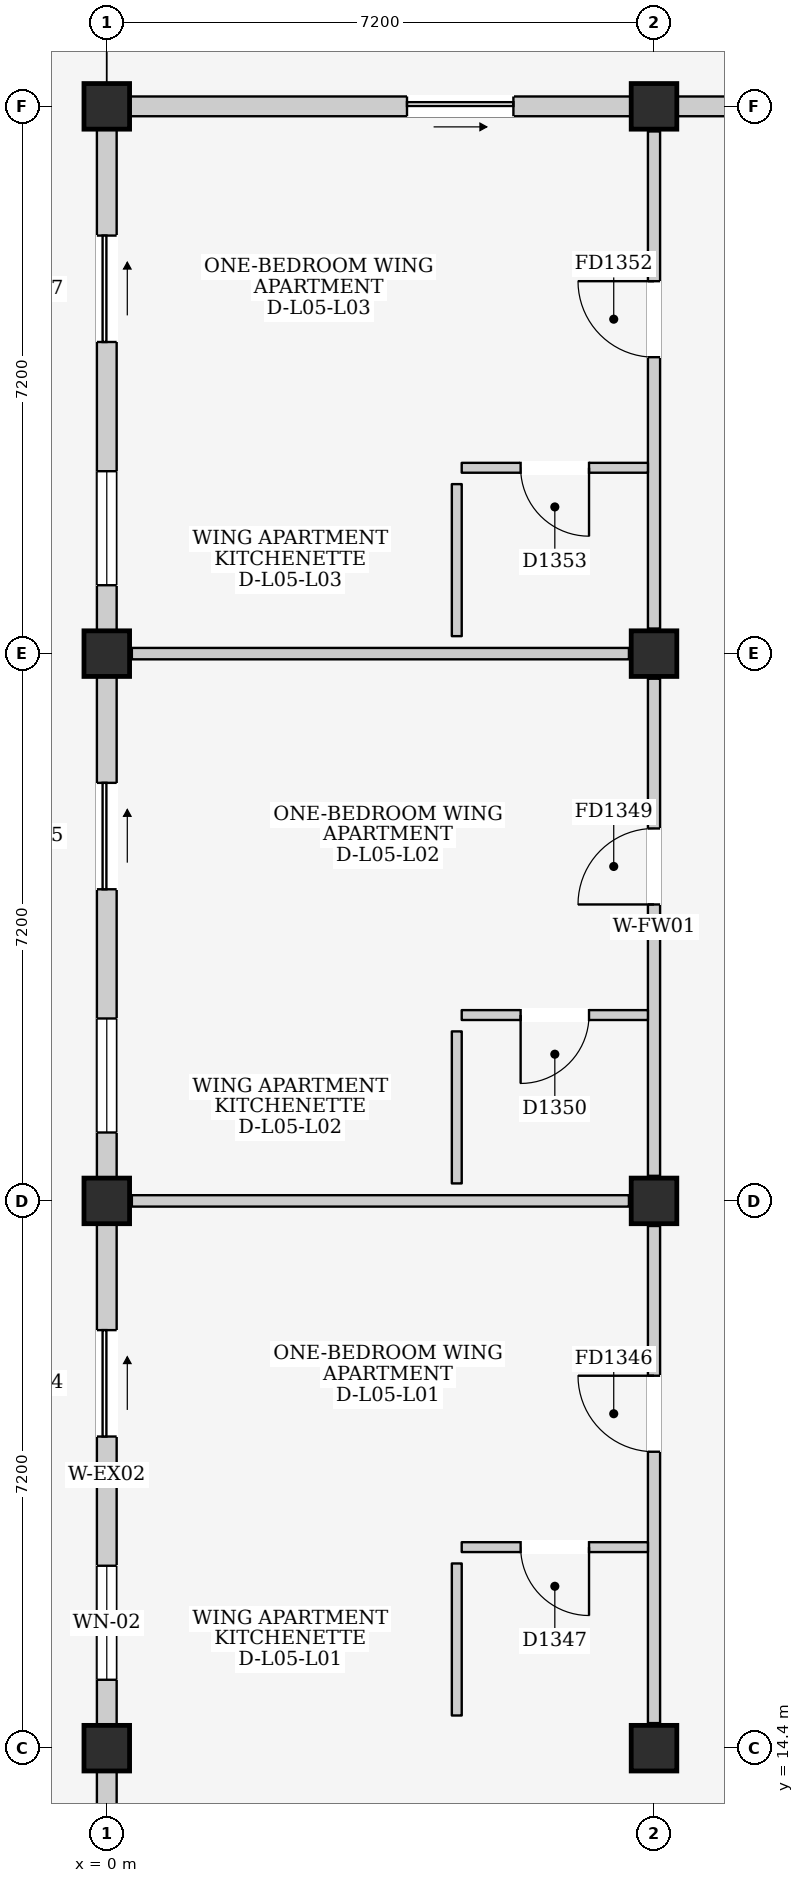
"""IFC4 building model, lengths in metres.
Left out: names, types, materials, properties, quantities, classifications, styles, units other than length and angle.
Written with IfcOpenShell. Run it as: python <this file> out.ifc"""

import sys

from ifc_helpers import new_model, si_unit, direction, frame, frame_2d, origin, origin_2d, place, context, subcontext, project, spatial, rectangle, extrude, element, fill, save


model = new_model("IFC4")
c1 = context("Model", 3, precision=1e-05, world=origin(), true_north=direction((0.0, 1.0)))
c2 = subcontext(c1, "Body", "Model", "MODEL_VIEW")
j1 = project(units=[si_unit("LENGTHUNIT", "METRE"), si_unit("PLANEANGLEUNIT", "RADIAN")], contexts=[c1])
p1 = place(None, origin())
s1 = spatial("IfcSite", under=j1, at=p1, CompositionType="ELEMENT")
p2 = place(p1, origin())
s2 = spatial("IfcBuilding", under=s1, at=p2, CompositionType="ELEMENT")
p3 = place(p2, frame((0.0, 0.0, 18.6)))
s3 = spatial("IfcBuildingStorey", under=s2, at=p3, CompositionType="ELEMENT", Elevation=18.6)
for number, where, z_axis, x_axis in (
    (1, (0.0, 14.4, 0.0), (0.0, 0.0, 1.0), (1.0, 0.0, 0.0)),
    (2, (0.0, 21.6, 0.0), (0.0, 0.0, 1.0), (1.0, 0.0, 0.0)),
    (3, (0.0, 28.8, 0.0), (0.0, 0.0, 1.0), (1.0, 0.0, 0.0)),
    (4, (0.0, 36.0, 0.0), (0.0, 0.0, 1.0), (1.0, 0.0, 0.0)),
    (5, (7.2, 14.4, 0.0), (0.0, 0.0, 1.0), (1.0, 0.0, 0.0)),
    (6, (7.2, 21.6, 0.0), (0.0, 0.0, 1.0), (1.0, 0.0, 0.0)),
    (7, (7.2, 28.8, 0.0), (0.0, 0.0, 1.0), (1.0, 0.0, 0.0)),
    (8, (7.2, 36.0, 0.0), (0.0, 0.0, 1.0), (1.0, 0.0, 0.0)),
):
    element("IfcColumn", number, at=place(p3, frame(where, z_axis=z_axis, x_axis=x_axis)), inside=s3, PredefinedType="COLUMN", context=c2, shape_type="SweptSolid", body=[
        extrude(rectangle(XDim=0.6, YDim=0.6, at=origin_2d()), origin(), (0.0, 0.0, 1.0), 3.3),
    ])
p4 = place(p3, frame((0.0, 7.5, 0.0), z_axis=(0.0, 0.0, 1.0), x_axis=(0.0, 1.0, 0.0)))
e9 = element("IfcWall", 9, at=p4, inside=s3, PredefinedType="ELEMENTEDWALL", context=c2, shape_type="SweptSolid", body=[
    extrude(rectangle(XDim=6.6, YDim=0.26, at=frame_2d((3.3, 0.0))), origin(), (0.0, 0.0, 1.0), 2.595),
])
p5 = place(p4, frame((3.65, 0.0, 0.0)))
e10 = element("IfcOpeningElement", 10, at=p5, cuts=e9, PredefinedType="OPENING", context=c2, shape_type="SweptSolid", body=[
    extrude(rectangle(XDim=1.4, YDim=2.1, at=frame_2d((0.7, 1.05))), frame((0.0, 0.145, 0.0), z_axis=(0.0, -1.0, 0.0), x_axis=(1.0, 0.0, 0.0)), (0.0, 0.0, 1.0), 0.29),
])
p6 = place(p3, frame((0.0, 14.7, 0.0), z_axis=(0.0, 0.0, 1.0), x_axis=(0.0, 1.0, 0.0)))
e11 = element("IfcWall", 11, at=p6, inside=s3, PredefinedType="ELEMENTEDWALL", context=c2, shape_type="SweptSolid", body=[
    extrude(rectangle(XDim=6.6, YDim=0.26, at=frame_2d((3.3, 0.0))), origin(), (0.0, 0.0, 1.0), 2.595),
])
p7 = place(p6, frame((3.8, 0.0, 0.0)))
e12 = element("IfcOpeningElement", 12, at=p7, cuts=e11, PredefinedType="OPENING", context=c2, shape_type="SweptSolid", body=[
    extrude(rectangle(XDim=1.4, YDim=2.1, at=frame_2d((0.7, 1.05))), frame((0.0, 0.145, 0.0), z_axis=(0.0, -1.0, 0.0), x_axis=(1.0, 0.0, 0.0)), (0.0, 0.0, 1.0), 0.29),
])
p8 = place(p6, frame((0.6, 0.0, 0.95)))
e13 = element("IfcOpeningElement", 13, at=p8, cuts=e11, PredefinedType="OPENING", context=c2, shape_type="SweptSolid", body=[
    extrude(rectangle(XDim=1.5, YDim=1.5, at=frame_2d((0.75, 0.75))), frame((0.0, 0.145, 0.0), z_axis=(0.0, -1.0, 0.0), x_axis=(1.0, 0.0, 0.0)), (0.0, 0.0, 1.0), 0.29),
])
p9 = place(p3, frame((0.0, 21.9, 0.0), z_axis=(0.0, 0.0, 1.0), x_axis=(0.0, 1.0, 0.0)))
e14 = element("IfcWall", 14, at=p9, inside=s3, PredefinedType="ELEMENTEDWALL", context=c2, shape_type="SweptSolid", body=[
    extrude(rectangle(XDim=6.6, YDim=0.26, at=frame_2d((3.3, 0.0))), origin(), (0.0, 0.0, 1.0), 2.595),
])
p10 = place(p9, frame((3.8, 0.0, 0.0)))
e15 = element("IfcOpeningElement", 15, at=p10, cuts=e14, PredefinedType="OPENING", context=c2, shape_type="SweptSolid", body=[
    extrude(rectangle(XDim=1.4, YDim=2.1, at=frame_2d((0.7, 1.05))), frame((0.0, 0.145, 0.0), z_axis=(0.0, -1.0, 0.0), x_axis=(1.0, 0.0, 0.0)), (0.0, 0.0, 1.0), 0.29),
])
p11 = place(p9, frame((0.6, 0.0, 0.95)))
e16 = element("IfcOpeningElement", 16, at=p11, cuts=e14, PredefinedType="OPENING", context=c2, shape_type="SweptSolid", body=[
    extrude(rectangle(XDim=1.5, YDim=1.5, at=frame_2d((0.75, 0.75))), frame((0.0, 0.145, 0.0), z_axis=(0.0, -1.0, 0.0), x_axis=(1.0, 0.0, 0.0)), (0.0, 0.0, 1.0), 0.29),
])
p12 = place(p3, frame((0.3, 36.0, 0.0), z_axis=(0.0, 0.0, 1.0), x_axis=(1.0, 0.0, 0.0)))
e17 = element("IfcWall", 17, at=p12, inside=s3, PredefinedType="ELEMENTEDWALL", context=c2, shape_type="SweptSolid", body=[
    extrude(rectangle(XDim=6.6, YDim=0.26, at=frame_2d((3.3, 0.0))), origin(), (0.0, 0.0, 1.0), 2.445),
])
p13 = place(p12, frame((3.65, 0.0, 0.0)))
e18 = element("IfcOpeningElement", 18, at=p13, cuts=e17, PredefinedType="OPENING", context=c2, shape_type="SweptSolid", body=[
    extrude(rectangle(XDim=1.4, YDim=2.1, at=frame_2d((0.7, 1.05))), frame((0.0, 0.145, 0.0), z_axis=(0.0, -1.0, 0.0), x_axis=(1.0, 0.0, 0.0)), (0.0, 0.0, 1.0), 0.29),
])
p14 = place(p3, frame((0.0, 29.1, 0.0), z_axis=(0.0, 0.0, 1.0), x_axis=(0.0, 1.0, 0.0)))
e19 = element("IfcWall", 19, at=p14, inside=s3, PredefinedType="ELEMENTEDWALL", context=c2, shape_type="SweptSolid", body=[
    extrude(rectangle(XDim=6.6, YDim=0.26, at=frame_2d((3.3, 0.0))), origin(), (0.0, 0.0, 1.0), 2.595),
])
p15 = place(p14, frame((3.8, 0.0, 0.0)))
e20 = element("IfcOpeningElement", 20, at=p15, cuts=e19, PredefinedType="OPENING", context=c2, shape_type="SweptSolid", body=[
    extrude(rectangle(XDim=1.4, YDim=2.1, at=frame_2d((0.7, 1.05))), frame((0.0, 0.145, 0.0), z_axis=(0.0, -1.0, 0.0), x_axis=(1.0, 0.0, 0.0)), (0.0, 0.0, 1.0), 0.29),
])
p16 = place(p14, frame((0.6, 0.0, 0.95)))
e21 = element("IfcOpeningElement", 21, at=p16, cuts=e19, PredefinedType="OPENING", context=c2, shape_type="SweptSolid", body=[
    extrude(rectangle(XDim=1.5, YDim=1.5, at=frame_2d((0.75, 0.75))), frame((0.0, 0.145, 0.0), z_axis=(0.0, -1.0, 0.0), x_axis=(1.0, 0.0, 0.0)), (0.0, 0.0, 1.0), 0.29),
])
p17 = place(p3, frame((7.5, 36.0, 0.0), z_axis=(0.0, 0.0, 1.0), x_axis=(1.0, 0.0, 0.0)))
e22 = element("IfcWall", 22, at=p17, inside=s3, PredefinedType="ELEMENTEDWALL", context=c2, shape_type="SweptSolid", body=[
    extrude(rectangle(XDim=6.6, YDim=0.26, at=frame_2d((3.3, 0.0))), origin(), (0.0, 0.0, 1.0), 2.445),
])
p18 = place(p17, frame((2.8, 0.0, 1.1)))
e23 = element("IfcOpeningElement", 23, at=p18, cuts=e22, PredefinedType="OPENING", context=c2, shape_type="SweptSolid", body=[
    extrude(rectangle(XDim=1.0, YDim=0.9, at=frame_2d((0.5, 0.45))), frame((0.0, 0.145, 0.0), z_axis=(0.0, -1.0, 0.0), x_axis=(1.0, 0.0, 0.0)), (0.0, 0.0, 1.0), 0.29),
])
p19 = place(p3, frame((7.2, 14.73, 0.0), z_axis=(0.0, 0.0, 1.0), x_axis=(0.0, 1.0, 0.0)))
e24 = element("IfcWall", 24, at=p19, inside=s3, PredefinedType="PARTITIONING", context=c2, shape_type="SweptSolid", body=[
    extrude(rectangle(XDim=6.54, YDim=0.16, at=frame_2d((3.27, 0.0))), origin(), (0.0, 0.0, 1.0), 2.545),
])
p20 = place(p19, frame((3.57, 0.0, 0.0)))
e25 = element("IfcOpeningElement", 25, at=p20, cuts=e24, PredefinedType="OPENING", context=c2, shape_type="SweptSolid", body=[
    extrude(rectangle(XDim=1.0, YDim=2.15, at=frame_2d((0.5, 1.075))), frame((0.0, 0.095, 0.0), z_axis=(0.0, -1.0, 0.0), x_axis=(1.0, 0.0, 0.0)), (0.0, 0.0, 1.0), 0.19),
])
p21 = place(p3, frame((0.33, 21.6, 0.0), z_axis=(0.0, 0.0, 1.0), x_axis=(1.0, 0.0, 0.0)))
e26 = element("IfcWall", 26, at=p21, inside=s3, PredefinedType="PARTITIONING", context=c2, shape_type="SweptSolid", body=[
    extrude(rectangle(XDim=6.54, YDim=0.15, at=frame_2d((3.27, 0.0))), origin(), (0.0, 0.0, 1.0), 2.445),
])
p22 = place(p3, frame((4.67, 17.045, 0.0), z_axis=(0.0, 0.0, 1.0), x_axis=(1.0, 0.0, 0.0)))
e27 = element("IfcWall", 27, at=p22, inside=s3, PredefinedType="PARTITIONING", context=c2, shape_type="SweptSolid", body=[
    extrude(rectangle(XDim=2.45, YDim=0.13, at=frame_2d((1.225, 0.0))), origin(), (0.0, 0.0, 1.0), 3.06),
])
p23 = place(p22, frame((0.775, 0.0, 0.0)))
e28 = element("IfcOpeningElement", 28, at=p23, cuts=e27, PredefinedType="OPENING", context=c2, shape_type="SweptSolid", body=[
    extrude(rectangle(XDim=0.9, YDim=2.1, at=frame_2d((0.45, 1.05))), frame((0.0, 0.08, 0.0), z_axis=(0.0, -1.0, 0.0), x_axis=(1.0, 0.0, 0.0)), (0.0, 0.0, 1.0), 0.16),
])
p24 = place(p3, frame((4.605, 14.83, 0.0), z_axis=(0.0, 0.0, 1.0), x_axis=(0.0, 1.0, 0.0)))
e29 = element("IfcWall", 29, at=p24, inside=s3, PredefinedType="PARTITIONING", context=c2, shape_type="SweptSolid", body=[
    extrude(rectangle(XDim=2.0, YDim=0.13, at=frame_2d((1.0, 0.0))), origin(), (0.0, 0.0, 1.0), 3.06),
])
p25 = place(p3, frame((7.2, 21.93, 0.0), z_axis=(0.0, 0.0, 1.0), x_axis=(0.0, 1.0, 0.0)))
e30 = element("IfcWall", 30, at=p25, inside=s3, PredefinedType="PARTITIONING", context=c2, shape_type="SweptSolid", body=[
    extrude(rectangle(XDim=6.54, YDim=0.16, at=frame_2d((3.27, 0.0))), origin(), (0.0, 0.0, 1.0), 2.545),
])
p26 = place(p25, frame((3.57, 0.0, 0.0)))
e31 = element("IfcOpeningElement", 31, at=p26, cuts=e30, PredefinedType="OPENING", context=c2, shape_type="SweptSolid", body=[
    extrude(rectangle(XDim=1.0, YDim=2.15, at=frame_2d((0.5, 1.075))), frame((0.0, 0.095, 0.0), z_axis=(0.0, -1.0, 0.0), x_axis=(1.0, 0.0, 0.0)), (0.0, 0.0, 1.0), 0.19),
])
p27 = place(p3, frame((0.33, 28.8, 0.0), z_axis=(0.0, 0.0, 1.0), x_axis=(1.0, 0.0, 0.0)))
e32 = element("IfcWall", 32, at=p27, inside=s3, PredefinedType="PARTITIONING", context=c2, shape_type="SweptSolid", body=[
    extrude(rectangle(XDim=6.54, YDim=0.15, at=frame_2d((3.27, 0.0))), origin(), (0.0, 0.0, 1.0), 2.445),
])
p28 = place(p3, frame((4.67, 24.045, 0.0), z_axis=(0.0, 0.0, 1.0), x_axis=(1.0, 0.0, 0.0)))
e33 = element("IfcWall", 33, at=p28, inside=s3, PredefinedType="PARTITIONING", context=c2, shape_type="SweptSolid", body=[
    extrude(rectangle(XDim=2.45, YDim=0.13, at=frame_2d((1.225, 0.0))), origin(), (0.0, 0.0, 1.0), 3.06),
])
p29 = place(p28, frame((0.775, 0.0, 0.0)))
e34 = element("IfcOpeningElement", 34, at=p29, cuts=e33, PredefinedType="OPENING", context=c2, shape_type="SweptSolid", body=[
    extrude(rectangle(XDim=0.9, YDim=2.1, at=frame_2d((0.45, 1.05))), frame((0.0, 0.08, 0.0), z_axis=(0.0, -1.0, 0.0), x_axis=(1.0, 0.0, 0.0)), (0.0, 0.0, 1.0), 0.16),
])
p30 = place(p3, frame((4.605, 21.83, 0.0), z_axis=(0.0, 0.0, 1.0), x_axis=(0.0, 1.0, 0.0)))
e35 = element("IfcWall", 35, at=p30, inside=s3, PredefinedType="PARTITIONING", context=c2, shape_type="SweptSolid", body=[
    extrude(rectangle(XDim=2.0, YDim=0.13, at=frame_2d((1.0, 0.0))), origin(), (0.0, 0.0, 1.0), 3.06),
])
p31 = place(p3, frame((7.2, 29.13, 0.0), z_axis=(0.0, 0.0, 1.0), x_axis=(0.0, 1.0, 0.0)))
e36 = element("IfcWall", 36, at=p31, inside=s3, PredefinedType="PARTITIONING", context=c2, shape_type="SweptSolid", body=[
    extrude(rectangle(XDim=6.54, YDim=0.16, at=frame_2d((3.27, 0.0))), origin(), (0.0, 0.0, 1.0), 2.545),
])
p32 = place(p31, frame((3.57, 0.0, 0.0)))
e37 = element("IfcOpeningElement", 37, at=p32, cuts=e36, PredefinedType="OPENING", context=c2, shape_type="SweptSolid", body=[
    extrude(rectangle(XDim=1.0, YDim=2.15, at=frame_2d((0.5, 1.075))), frame((0.0, 0.095, 0.0), z_axis=(0.0, -1.0, 0.0), x_axis=(1.0, 0.0, 0.0)), (0.0, 0.0, 1.0), 0.19),
])
p33 = place(p3, frame((4.67, 31.245, 0.0), z_axis=(0.0, 0.0, 1.0), x_axis=(1.0, 0.0, 0.0)))
e38 = element("IfcWall", 38, at=p33, inside=s3, PredefinedType="PARTITIONING", context=c2, shape_type="SweptSolid", body=[
    extrude(rectangle(XDim=2.45, YDim=0.13, at=frame_2d((1.225, 0.0))), origin(), (0.0, 0.0, 1.0), 3.06),
])
p34 = place(p33, frame((0.775, 0.0, 0.0)))
e39 = element("IfcOpeningElement", 39, at=p34, cuts=e38, PredefinedType="OPENING", context=c2, shape_type="SweptSolid", body=[
    extrude(rectangle(XDim=0.9, YDim=2.1, at=frame_2d((0.45, 1.05))), frame((0.0, 0.08, 0.0), z_axis=(0.0, -1.0, 0.0), x_axis=(1.0, 0.0, 0.0)), (0.0, 0.0, 1.0), 0.16),
])
p35 = place(p3, frame((4.605, 29.03, 0.0), z_axis=(0.0, 0.0, 1.0), x_axis=(0.0, 1.0, 0.0)))
e40 = element("IfcWall", 40, at=p35, inside=s3, PredefinedType="PARTITIONING", context=c2, shape_type="SweptSolid", body=[
    extrude(rectangle(XDim=2.0, YDim=0.13, at=frame_2d((1.0, 0.0))), origin(), (0.0, 0.0, 1.0), 3.06),
])
p36 = place(p7, frame((1.4, 0.0, 0.0), z_axis=(0.0, 0.0, 1.0), x_axis=(-1.0, 0.0, 0.0)))
e41 = element("IfcDoor", 41, at=p36, inside=s3, OperationType="SLIDING_TO_RIGHT", PredefinedType="DOOR", context=c2, shape_type="SweptSolid", body=[
    extrude(rectangle(XDim=1.4, YDim=2.1, at=frame_2d((0.7, 1.05))), frame((0.0, 0.025, 0.0), z_axis=(0.0, -1.0, 0.0), x_axis=(1.0, 0.0, 0.0)), (0.0, 0.0, 1.0), 0.05),
])
fill(e12, e41)
p37 = place(p8, origin())
e42 = element("IfcWindow", 42, at=p37, inside=s3, PartitioningType="DOUBLE_PANEL_VERTICAL", PredefinedType="WINDOW", context=c2, shape_type="SweptSolid", body=[
    extrude(rectangle(XDim=1.5, YDim=1.5, at=frame_2d((0.75, 0.75))), frame((0.0, 0.03, 0.0), z_axis=(0.0, -1.0, 0.0), x_axis=(1.0, 0.0, 0.0)), (0.0, 0.0, 1.0), 0.06),
])
fill(e13, e42)
p38 = place(p10, frame((1.4, 0.0, 0.0), z_axis=(0.0, 0.0, 1.0), x_axis=(-1.0, 0.0, 0.0)))
e43 = element("IfcDoor", 43, at=p38, inside=s3, OperationType="SLIDING_TO_RIGHT", PredefinedType="DOOR", context=c2, shape_type="SweptSolid", body=[
    extrude(rectangle(XDim=1.4, YDim=2.1, at=frame_2d((0.7, 1.05))), frame((0.0, 0.025, 0.0), z_axis=(0.0, -1.0, 0.0), x_axis=(1.0, 0.0, 0.0)), (0.0, 0.0, 1.0), 0.05),
])
fill(e15, e43)
p39 = place(p11, origin())
e44 = element("IfcWindow", 44, at=p39, inside=s3, PartitioningType="DOUBLE_PANEL_VERTICAL", PredefinedType="WINDOW", context=c2, shape_type="SweptSolid", body=[
    extrude(rectangle(XDim=1.5, YDim=1.5, at=frame_2d((0.75, 0.75))), frame((0.0, 0.03, 0.0), z_axis=(0.0, -1.0, 0.0), x_axis=(1.0, 0.0, 0.0)), (0.0, 0.0, 1.0), 0.06),
])
fill(e16, e44)
p40 = place(p13, frame((1.4, 0.0, 0.0), z_axis=(0.0, 0.0, 1.0), x_axis=(-1.0, 0.0, 0.0)))
e45 = element("IfcDoor", 45, at=p40, inside=s3, OperationType="SLIDING_TO_RIGHT", PredefinedType="DOOR", context=c2, shape_type="SweptSolid", body=[
    extrude(rectangle(XDim=1.4, YDim=2.1, at=frame_2d((0.7, 1.05))), frame((0.0, 0.025, 0.0), z_axis=(0.0, -1.0, 0.0), x_axis=(1.0, 0.0, 0.0)), (0.0, 0.0, 1.0), 0.05),
])
fill(e18, e45)
p41 = place(p15, frame((1.4, 0.0, 0.0), z_axis=(0.0, 0.0, 1.0), x_axis=(-1.0, 0.0, 0.0)))
e46 = element("IfcDoor", 46, at=p41, inside=s3, OperationType="SLIDING_TO_RIGHT", PredefinedType="DOOR", context=c2, shape_type="SweptSolid", body=[
    extrude(rectangle(XDim=1.4, YDim=2.1, at=frame_2d((0.7, 1.05))), frame((0.0, 0.025, 0.0), z_axis=(0.0, -1.0, 0.0), x_axis=(1.0, 0.0, 0.0)), (0.0, 0.0, 1.0), 0.05),
])
fill(e20, e46)
p42 = place(p16, origin())
e47 = element("IfcWindow", 47, at=p42, inside=s3, PartitioningType="DOUBLE_PANEL_VERTICAL", PredefinedType="WINDOW", context=c2, shape_type="SweptSolid", body=[
    extrude(rectangle(XDim=1.5, YDim=1.5, at=frame_2d((0.75, 0.75))), frame((0.0, 0.03, 0.0), z_axis=(0.0, -1.0, 0.0), x_axis=(1.0, 0.0, 0.0)), (0.0, 0.0, 1.0), 0.06),
])
fill(e21, e47)
p43 = place(p20, origin())
e48 = element("IfcDoor", 48, at=p43, inside=s3, OperationType="SINGLE_SWING_RIGHT", PredefinedType="DOOR", context=c2, shape_type="SweptSolid", body=[
    extrude(rectangle(XDim=1.0, YDim=2.15, at=frame_2d((0.5, 1.075))), frame((0.0, 0.025, 0.0), z_axis=(0.0, -1.0, 0.0), x_axis=(1.0, 0.0, 0.0)), (0.0, 0.0, 1.0), 0.05),
])
fill(e25, e48)
p44 = place(p23, frame((0.9, 0.0, 0.0), z_axis=(0.0, 0.0, 1.0), x_axis=(-1.0, 0.0, 0.0)))
e49 = element("IfcDoor", 49, at=p44, inside=s3, OperationType="SINGLE_SWING_LEFT", PredefinedType="DOOR", context=c2, shape_type="SweptSolid", body=[
    extrude(rectangle(XDim=0.9, YDim=2.1, at=frame_2d((0.45, 1.05))), frame((0.0, 0.025, 0.0), z_axis=(0.0, -1.0, 0.0), x_axis=(1.0, 0.0, 0.0)), (0.0, 0.0, 1.0), 0.05),
])
fill(e28, e49)
p45 = place(p26, origin())
e50 = element("IfcDoor", 50, at=p45, inside=s3, OperationType="SINGLE_SWING_LEFT", PredefinedType="DOOR", context=c2, shape_type="SweptSolid", body=[
    extrude(rectangle(XDim=1.0, YDim=2.15, at=frame_2d((0.5, 1.075))), frame((0.0, 0.025, 0.0), z_axis=(0.0, -1.0, 0.0), x_axis=(1.0, 0.0, 0.0)), (0.0, 0.0, 1.0), 0.05),
])
fill(e31, e50)
p46 = place(p29, frame((0.9, 0.0, 0.0), z_axis=(0.0, 0.0, 1.0), x_axis=(-1.0, 0.0, 0.0)))
e51 = element("IfcDoor", 51, at=p46, inside=s3, OperationType="SINGLE_SWING_RIGHT", PredefinedType="DOOR", context=c2, shape_type="SweptSolid", body=[
    extrude(rectangle(XDim=0.9, YDim=2.1, at=frame_2d((0.45, 1.05))), frame((0.0, 0.025, 0.0), z_axis=(0.0, -1.0, 0.0), x_axis=(1.0, 0.0, 0.0)), (0.0, 0.0, 1.0), 0.05),
])
fill(e34, e51)
p47 = place(p32, origin())
e52 = element("IfcDoor", 52, at=p47, inside=s3, OperationType="SINGLE_SWING_RIGHT", PredefinedType="DOOR", context=c2, shape_type="SweptSolid", body=[
    extrude(rectangle(XDim=1.0, YDim=2.15, at=frame_2d((0.5, 1.075))), frame((0.0, 0.025, 0.0), z_axis=(0.0, -1.0, 0.0), x_axis=(1.0, 0.0, 0.0)), (0.0, 0.0, 1.0), 0.05),
])
fill(e37, e52)
p48 = place(p34, frame((0.9, 0.0, 0.0), z_axis=(0.0, 0.0, 1.0), x_axis=(-1.0, 0.0, 0.0)))
e53 = element("IfcDoor", 53, at=p48, inside=s3, OperationType="SINGLE_SWING_LEFT", PredefinedType="DOOR", context=c2, shape_type="SweptSolid", body=[
    extrude(rectangle(XDim=0.9, YDim=2.1, at=frame_2d((0.45, 1.05))), frame((0.0, 0.025, 0.0), z_axis=(0.0, -1.0, 0.0), x_axis=(1.0, 0.0, 0.0)), (0.0, 0.0, 1.0), 0.05),
])
fill(e39, e53)
save(model, sys.argv[1])
